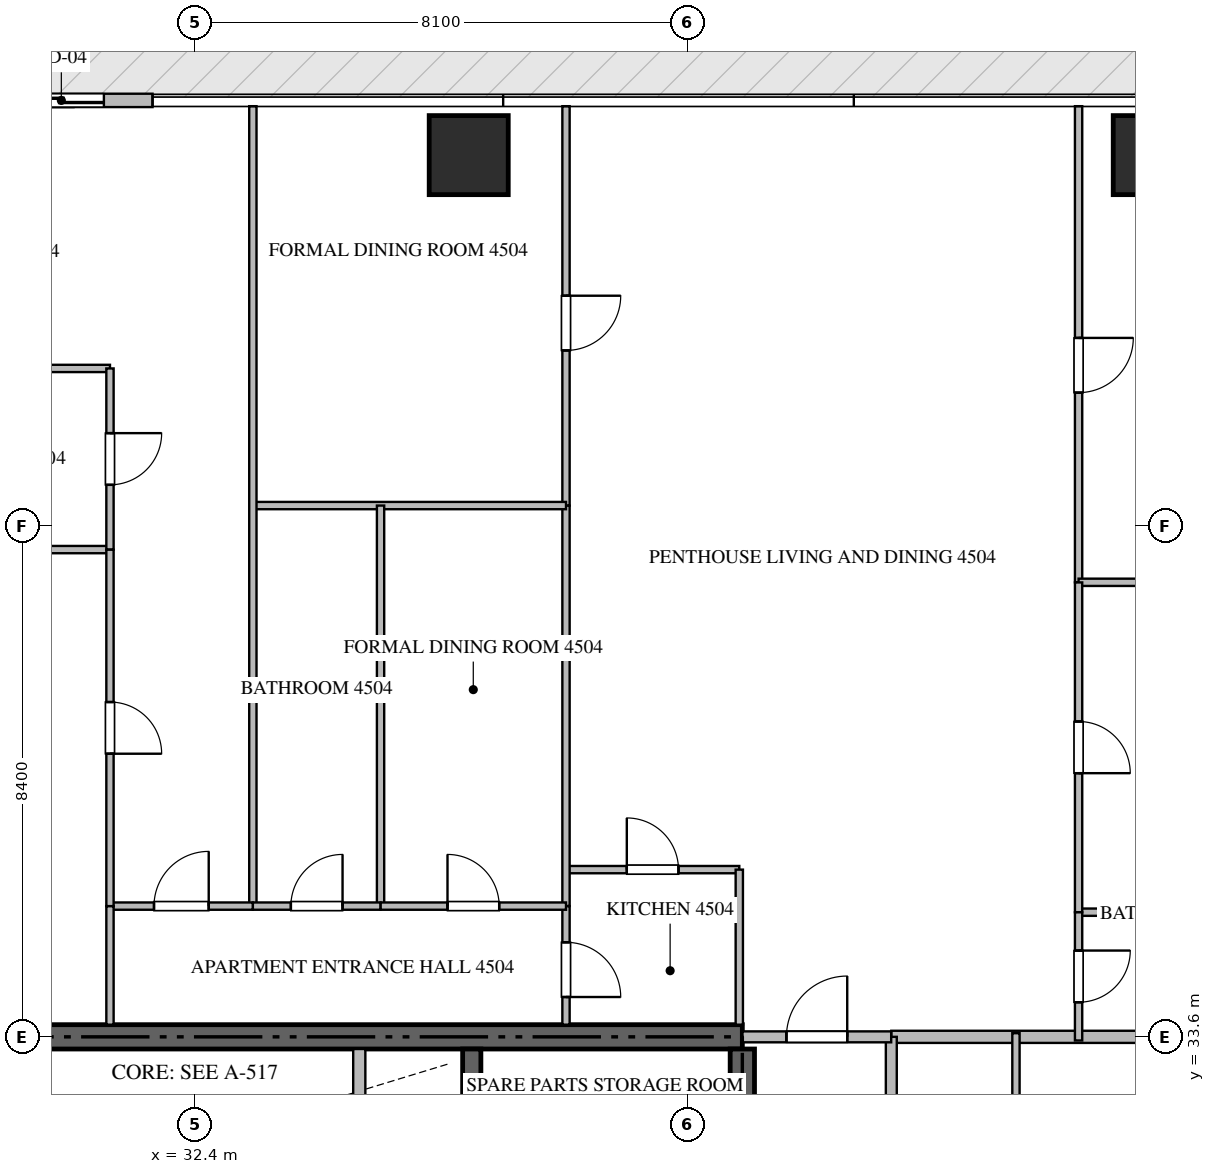
"""IFC4 building model, lengths in metres.
Left out: names, types, materials, properties, quantities, classifications, styles, units other than length and angle.
Written with IfcOpenShell. Run it as: python <this file> out.ifc"""

import sys

from ifc_helpers import new_model, si_unit, direction, frame, frame_2d, origin, origin_2d, place, context, subcontext, project, spatial, rectangle, extrude, source, transform, mapped, element, fill, save


model = new_model("IFC4")
c1 = context("Model", 3, precision=1e-05, world=origin(), true_north=direction((0.0, 1.0)))
c2 = subcontext(c1, "Body", "Model", "MODEL_VIEW")
j1 = project(units=[si_unit("LENGTHUNIT", "METRE"), si_unit("PLANEANGLEUNIT", "RADIAN")], contexts=[c1])
p1 = place(None, origin())
s1 = spatial("IfcSite", under=j1, at=p1, CompositionType="ELEMENT")
p2 = place(p1, origin())
s2 = spatial("IfcBuilding", under=s1, at=p2, CompositionType="ELEMENT")
p3 = place(p2, frame((0.0, 0.0, 180.15)))
s3 = spatial("IfcBuildingStorey", under=s2, at=p3, CompositionType="ELEMENT", Elevation=180.15)
p4 = place(p3, frame((41.4, 33.6, -0.26), z_axis=(0.0, 0.0, 1.0), x_axis=(-1.0, 0.0, 0.0)))
e1 = element("IfcWall", 1, at=p4, inside=s3, PredefinedType="SHEAR", context=c2, shape_type="SweptSolid", body=[
    extrude(rectangle(XDim=18.0, YDim=0.4, at=frame_2d((9.0, 0.0))), origin(), (0.0, 0.0, 1.0), 3.748),
])
p5 = place(p3, frame((41.4, 27.75, -0.26), z_axis=(0.0, 0.0, 1.0), x_axis=(0.0, 1.0, 0.0)))
e2 = element("IfcWall", 2, at=p5, inside=s3, PredefinedType="SHEAR", context=c2, shape_type="SweptSolid", body=[
    extrude(rectangle(XDim=5.65, YDim=0.4, at=frame_2d((2.825, 0.0))), origin(), (0.0, 0.0, 1.0), 3.748),
])
p6 = place(p3, frame((36.95, 27.05, -0.26), z_axis=(0.0, 0.0, 1.0), x_axis=(0.0, 1.0, 0.0)))
e3 = element("IfcWall", 3, at=p6, inside=s3, PredefinedType="SHEAR", context=c2, shape_type="SweptSolid", body=[
    extrude(rectangle(XDim=6.35, YDim=0.3, at=frame_2d((3.175, 0.0))), origin(), (0.0, 0.0, 1.0), 3.748),
])
m1 = source(origin(), c2, "Body", "SweptSolid", [
    extrude(rectangle(XDim=1.3, YDim=1.3, at=origin_2d()), origin(), (0.0, 0.0, 1.0), 3.75),
])
for number, where, z_axis, x_axis in (
    (4, (36.9, 48.1, -0.26), (0.0, 0.0, 1.0), (1.0, 0.0, 0.0)),
    (5, (48.15, 48.1, -0.26), (0.0, 0.0, 1.0), (1.0, 0.0, 0.0)),
):
    element("IfcColumn", number, at=place(p3, frame(where, z_axis=z_axis, x_axis=x_axis)), inside=s3, PredefinedType="COLUMN", context=c2, shape_type="MappedRepresentation", body=[
        mapped(m1, transform((0.0, 0.0, 0.0), scale=1.0)),
    ])
p7 = place(p3, frame((31.7, 49.0, 0.0), z_axis=(0.0, 0.0, 1.0), x_axis=(-1.0, 0.0, 0.0)))
e6 = element("IfcWall", 6, at=p7, inside=s3, PredefinedType="ELEMENTEDWALL", context=c2, shape_type="SweptSolid", body=[
    extrude(rectangle(XDim=3.0, YDim=0.22, at=frame_2d((1.5, 0.0))), origin(), (0.0, 0.0, 1.0), 3.475),
])
p8 = place(p7, frame((0.8, 0.0, 0.0)))
e7 = element("IfcOpeningElement", 7, at=p8, cuts=e6, PredefinedType="OPENING", context=c2, shape_type="SweptSolid", body=[
    extrude(rectangle(XDim=1.4, YDim=2.25, at=frame_2d((0.7, 1.125))), frame((0.0, 0.12, 0.0), z_axis=(0.0, -1.0, 0.0), x_axis=(1.0, 0.0, 0.0)), (0.0, 0.0, 1.0), 0.24),
])
p9 = place(p3, frame((35.1, 30.75, 0.0), z_axis=(0.0, 0.0, 1.0), x_axis=(0.0, 1.0, 0.0)))
e8 = element("IfcWall", 8, at=p9, inside=s3, PredefinedType="STANDARD", context=c2, shape_type="SweptSolid", body=[
    extrude(rectangle(XDim=2.65, YDim=0.2, at=frame_2d((1.325, 0.0))), origin(), (0.0, 0.0, 1.0), 3.49),
])
p10 = place(p3, frame((43.85, 33.6, 0.0), z_axis=(0.0, 0.0, 1.0), x_axis=(1.0, 0.0, 0.0)))
e9 = element("IfcWall", 9, at=p10, inside=s3, PredefinedType="PARTITIONING", context=c2, shape_type="SweptSolid", body=[
    extrude(rectangle(XDim=13.068, YDim=0.2, at=frame_2d((6.534, 0.0))), origin(), (0.0, 0.0, 1.0), 3.49),
])
p11 = place(p3, frame((43.85, 14.9, 0.0), z_axis=(0.0, 0.0, 1.0), x_axis=(0.0, 1.0, 0.0)))
e10 = element("IfcWall", 10, at=p11, inside=s3, PredefinedType="PARTITIONING", context=c2, shape_type="SweptSolid", body=[
    extrude(rectangle(XDim=18.7, YDim=0.18, at=frame_2d((9.35, 0.0))), origin(), (0.0, 0.0, 1.0), 3.49),
])
p12 = place(p11, frame((5.629, 0.0, 0.0)))
e11 = element("IfcOpeningElement", 11, at=p12, cuts=e10, PredefinedType="OPENING", context=c2, shape_type="SweptSolid", body=[
    extrude(rectangle(XDim=1.0, YDim=2.15, at=frame_2d((0.5, 1.075))), frame((0.0, 0.1, 0.0), z_axis=(0.0, -1.0, 0.0), x_axis=(1.0, 0.0, 0.0)), (0.0, 0.0, 1.0), 0.2),
])
p13 = place(p11, frame((10.709, 0.0, 0.0)))
e12 = element("IfcOpeningElement", 12, at=p13, cuts=e10, PredefinedType="OPENING", context=c2, shape_type="SweptSolid", body=[
    extrude(rectangle(XDim=1.0, YDim=2.15, at=frame_2d((0.5, 1.075))), frame((0.0, 0.1, 0.0), z_axis=(0.0, -1.0, 0.0), x_axis=(1.0, 0.0, 0.0)), (0.0, 0.0, 1.0), 0.2),
])
p14 = place(p3, frame((41.402, 33.6, 0.0), z_axis=(0.0, 0.0, 1.0), x_axis=(1.0, 0.0, 0.0)))
e13 = element("IfcWall", 13, at=p14, inside=s3, PredefinedType="PARTITIONING", context=c2, shape_type="SweptSolid", body=[
    extrude(rectangle(XDim=2.446, YDim=0.18, at=frame_2d((1.223, 0.0))), origin(), (0.0, 0.0, 1.0), 3.49),
])
p15 = place(p14, frame((0.723, 0.0, 0.0)))
e14 = element("IfcOpeningElement", 14, at=p15, cuts=e13, PredefinedType="OPENING", context=c2, shape_type="SweptSolid", body=[
    extrude(rectangle(XDim=1.0, YDim=2.15, at=frame_2d((0.5, 1.075))), frame((0.0, 0.1, 0.0), z_axis=(0.0, -1.0, 0.0), x_axis=(1.0, 0.0, 0.0)), (0.0, 0.0, 1.0), 0.2),
])
p16 = place(p3, frame((38.5, 36.35, 0.0), z_axis=(0.0, 0.0, 1.0), x_axis=(1.0, 0.0, 0.0)))
e15 = element("IfcWall", 15, at=p16, inside=s3, PredefinedType="PARTITIONING", context=c2, shape_type="SweptSolid", body=[
    extrude(rectangle(XDim=2.85, YDim=0.12, at=frame_2d((1.425, 0.0))), origin(), (0.0, 0.0, 1.0), 3.49),
])
p17 = place(p16, frame((1.0, 0.0, 0.0)))
e16 = element("IfcOpeningElement", 16, at=p17, cuts=e15, PredefinedType="OPENING", context=c2, shape_type="SweptSolid", body=[
    extrude(rectangle(XDim=0.85, YDim=2.1, at=frame_2d((0.425, 1.05))), frame((0.0, 0.07, 0.0), z_axis=(0.0, -1.0, 0.0), x_axis=(1.0, 0.0, 0.0)), (0.0, 0.0, 1.0), 0.14),
])
p18 = place(p3, frame((41.35, 36.35, 0.0), z_axis=(0.0, 0.0, 1.0), x_axis=(0.0, -1.0, 0.0)))
e17 = element("IfcWall", 17, at=p18, inside=s3, PredefinedType="PARTITIONING", context=c2, shape_type="SweptSolid", body=[
    extrude(rectangle(XDim=2.55, YDim=0.12, at=frame_2d((1.275, 0.0))), origin(), (0.0, 0.0, 1.0), 3.49),
])
p19 = place(p3, frame((38.5, 35.75, 0.0), z_axis=(0.0, 0.0, 1.0), x_axis=(0.0, -1.0, 0.0)))
e18 = element("IfcWall", 18, at=p19, inside=s3, PredefinedType="PARTITIONING", context=c2, shape_type="SweptSolid", body=[
    extrude(rectangle(XDim=1.95, YDim=0.12, at=frame_2d((0.975, 0.0))), origin(), (0.0, 0.0, 1.0), 3.49),
])
p20 = place(p19, frame((0.595, 0.0, 0.0)))
e19 = element("IfcOpeningElement", 19, at=p20, cuts=e18, PredefinedType="OPENING", context=c2, shape_type="SweptSolid", body=[
    extrude(rectangle(XDim=0.9, YDim=2.1, at=frame_2d((0.45, 1.05))), frame((0.0, 0.07, 0.0), z_axis=(0.0, -1.0, 0.0), x_axis=(1.0, 0.0, 0.0)), (0.0, 0.0, 1.0), 0.14),
])
p21 = place(p3, frame((38.5, 48.905, 0.0), z_axis=(0.0, 0.0, 1.0), x_axis=(0.0, -1.0, 0.0)))
e20 = element("IfcWall", 20, at=p21, inside=s3, PredefinedType="PARTITIONING", context=c2, shape_type="SweptSolid", body=[
    extrude(rectangle(XDim=6.568, YDim=0.12, at=frame_2d((3.284, 0.0))), origin(), (0.0, 0.0, 1.0), 3.49),
])
p22 = place(p21, frame((3.117, 0.0, 0.0)))
e21 = element("IfcOpeningElement", 21, at=p22, cuts=e20, PredefinedType="OPENING", context=c2, shape_type="SweptSolid", body=[
    extrude(rectangle(XDim=0.9, YDim=2.1, at=frame_2d((0.45, 1.05))), frame((0.0, 0.07, 0.0), z_axis=(0.0, -1.0, 0.0), x_axis=(1.0, 0.0, 0.0)), (0.0, 0.0, 1.0), 0.14),
])
p23 = place(p3, frame((38.5, 42.335, 0.0), z_axis=(0.0, 0.0, 1.0), x_axis=(0.0, -1.0, 0.0)))
e22 = element("IfcWall", 22, at=p23, inside=s3, PredefinedType="PARTITIONING", context=c2, shape_type="SweptSolid", body=[
    extrude(rectangle(XDim=6.583, YDim=0.12, at=frame_2d((3.292, 0.0))), origin(), (0.0, 0.0, 1.0), 3.49),
])
p24 = place(p3, frame((33.35, 42.337, 0.0), z_axis=(0.0, 0.0, 1.0), x_axis=(1.0, 0.0, 0.0)))
e23 = element("IfcWall", 23, at=p24, inside=s3, PredefinedType="PARTITIONING", context=c2, shape_type="SweptSolid", body=[
    extrude(rectangle(XDim=5.15, YDim=0.12, at=frame_2d((2.575, 0.0))), origin(), (0.0, 0.0, 1.0), 3.49),
])
p25 = place(p3, frame((33.35, 48.905, 0.0), z_axis=(0.0, 0.0, 1.0), x_axis=(0.0, -1.0, 0.0)))
e24 = element("IfcWall", 24, at=p25, inside=s3, PredefinedType="PARTITIONING", context=c2, shape_type="SweptSolid", body=[
    extrude(rectangle(XDim=13.155, YDim=0.12, at=frame_2d((6.578, 0.0))), origin(), (0.0, 0.0, 1.0), 3.49),
])
p26 = place(p3, frame((35.45, 42.337, 0.0), z_axis=(0.0, 0.0, 1.0), x_axis=(0.0, -1.0, 0.0)))
e25 = element("IfcWall", 25, at=p26, inside=s3, PredefinedType="PARTITIONING", context=c2, shape_type="SweptSolid", body=[
    extrude(rectangle(XDim=6.587, YDim=0.12, at=frame_2d((3.293, 0.0))), origin(), (0.0, 0.0, 1.0), 3.49),
])
p27 = place(p3, frame((33.35, 35.75, 0.0), z_axis=(0.0, 0.0, 1.0), x_axis=(1.0, 0.0, 0.0)))
e26 = element("IfcWall", 26, at=p27, inside=s3, PredefinedType="PARTITIONING", context=c2, shape_type="SweptSolid", body=[
    extrude(rectangle(XDim=2.1, YDim=0.12, at=frame_2d((1.05, 0.0))), origin(), (0.0, 0.0, 1.0), 3.49),
])
p28 = place(p27, frame((0.625, 0.0, 0.0)))
e27 = element("IfcOpeningElement", 27, at=p28, cuts=e26, PredefinedType="OPENING", context=c2, shape_type="SweptSolid", body=[
    extrude(rectangle(XDim=0.85, YDim=2.1, at=frame_2d((0.425, 1.05))), frame((0.0, 0.07, 0.0), z_axis=(0.0, -1.0, 0.0), x_axis=(1.0, 0.0, 0.0)), (0.0, 0.0, 1.0), 0.14),
])
p29 = place(p3, frame((35.452, 35.75, 0.0), z_axis=(0.0, 0.0, 1.0), x_axis=(1.0, 0.0, 0.0)))
e28 = element("IfcWall", 28, at=p29, inside=s3, PredefinedType="PARTITIONING", context=c2, shape_type="SweptSolid", body=[
    extrude(rectangle(XDim=3.048, YDim=0.12, at=frame_2d((1.524, 0.0))), origin(), (0.0, 0.0, 1.0), 3.49),
])
p30 = place(p29, frame((1.099, 0.0, 0.0)))
e29 = element("IfcOpeningElement", 29, at=p30, cuts=e28, PredefinedType="OPENING", context=c2, shape_type="SweptSolid", body=[
    extrude(rectangle(XDim=0.85, YDim=2.1, at=frame_2d((0.425, 1.05))), frame((0.0, 0.07, 0.0), z_axis=(0.0, -1.0, 0.0), x_axis=(1.0, 0.0, 0.0)), (0.0, 0.0, 1.0), 0.14),
])
p31 = place(p3, frame((31.0, 35.75, 0.0), z_axis=(0.0, 0.0, 1.0), x_axis=(1.0, 0.0, 0.0)))
e30 = element("IfcWall", 30, at=p31, inside=s3, PredefinedType="PARTITIONING", context=c2, shape_type="SweptSolid", body=[
    extrude(rectangle(XDim=2.348, YDim=0.12, at=frame_2d((1.174, 0.0))), origin(), (0.0, 0.0, 1.0), 3.49),
])
p32 = place(p31, frame((0.724, 0.0, 0.0)))
e31 = element("IfcOpeningElement", 31, at=p32, cuts=e30, PredefinedType="OPENING", context=c2, shape_type="SweptSolid", body=[
    extrude(rectangle(XDim=0.9, YDim=2.1, at=frame_2d((0.45, 1.05))), frame((0.0, 0.07, 0.0), z_axis=(0.0, -1.0, 0.0), x_axis=(1.0, 0.0, 0.0)), (0.0, 0.0, 1.0), 0.14),
])
for number, where, z_axis, x_axis in (
    (32, (26.3, 44.592, 0.0), (0.0, 0.0, 1.0), (1.0, 0.0, 0.0)),
    (33, (26.3, 41.613, 0.0), (0.0, 0.0, 1.0), (1.0, 0.0, 0.0)),
):
    element("IfcWall", number, at=place(p3, frame(where, z_axis=z_axis, x_axis=x_axis)), inside=s3, PredefinedType="PARTITIONING", context=c2, shape_type="SweptSolid", body=[
        extrude(rectangle(XDim=4.7, YDim=0.12, at=frame_2d((2.35, 0.0))), origin(), (0.0, 0.0, 1.0), 3.49),
    ])
p33 = place(p3, frame((31.0, 44.592, 0.0), z_axis=(0.0, 0.0, 1.0), x_axis=(0.0, -1.0, 0.0)))
e34 = element("IfcWall", 34, at=p33, inside=s3, PredefinedType="PARTITIONING", context=c2, shape_type="SweptSolid", body=[
    extrude(rectangle(XDim=2.979, YDim=0.12, at=frame_2d((1.49, 0.0))), origin(), (0.0, 0.0, 1.0), 3.49),
])
p34 = place(p33, frame((1.064, 0.0, 0.0)))
e35 = element("IfcOpeningElement", 35, at=p34, cuts=e34, PredefinedType="OPENING", context=c2, shape_type="SweptSolid", body=[
    extrude(rectangle(XDim=0.85, YDim=2.1, at=frame_2d((0.425, 1.05))), frame((0.0, 0.07, 0.0), z_axis=(0.0, -1.0, 0.0), x_axis=(1.0, 0.0, 0.0)), (0.0, 0.0, 1.0), 0.14),
])
p35 = place(p3, frame((31.0, 41.611, 0.0), z_axis=(0.0, 0.0, 1.0), x_axis=(0.0, -1.0, 0.0)))
e36 = element("IfcWall", 36, at=p35, inside=s3, PredefinedType="PARTITIONING", context=c2, shape_type="SweptSolid", body=[
    extrude(rectangle(XDim=5.861, YDim=0.12, at=frame_2d((2.931, 0.0))), origin(), (0.0, 0.0, 1.0), 3.49),
])
p36 = place(p35, frame((2.505, 0.0, 0.0)))
e37 = element("IfcOpeningElement", 37, at=p36, cuts=e36, PredefinedType="OPENING", context=c2, shape_type="SweptSolid", body=[
    extrude(rectangle(XDim=0.85, YDim=2.1, at=frame_2d((0.425, 1.05))), frame((0.0, 0.07, 0.0), z_axis=(0.0, -1.0, 0.0), x_axis=(1.0, 0.0, 0.0)), (0.0, 0.0, 1.0), 0.14),
])
p37 = place(p3, frame((31.0, 35.748, 0.0), z_axis=(0.0, 0.0, 1.0), x_axis=(0.0, -1.0, 0.0)))
e38 = element("IfcWall", 38, at=p37, inside=s3, PredefinedType="PARTITIONING", context=c2, shape_type="SweptSolid", body=[
    extrude(rectangle(XDim=1.948, YDim=0.12, at=frame_2d((0.974, 0.0))), origin(), (0.0, 0.0, 1.0), 3.49),
])
p38 = place(p3, frame((46.93, 48.905, 0.0), z_axis=(0.0, 0.0, 1.0), x_axis=(0.0, -1.0, 0.0)))
e39 = element("IfcWall", 39, at=p38, inside=s3, PredefinedType="PARTITIONING", context=c2, shape_type="SweptSolid", body=[
    extrude(rectangle(XDim=7.83, YDim=0.12, at=frame_2d((3.915, 0.0))), origin(), (0.0, 0.0, 1.0), 3.49),
])
p39 = place(p38, frame((3.811, 0.0, 0.0)))
e40 = element("IfcOpeningElement", 40, at=p39, cuts=e39, PredefinedType="OPENING", context=c2, shape_type="SweptSolid", body=[
    extrude(rectangle(XDim=0.9, YDim=2.1, at=frame_2d((0.45, 1.05))), frame((0.0, 0.07, 0.0), z_axis=(0.0, -1.0, 0.0), x_axis=(1.0, 0.0, 0.0)), (0.0, 0.0, 1.0), 0.14),
])
p40 = place(p3, frame((46.93, 41.075, 0.0), z_axis=(0.0, 0.0, 1.0), x_axis=(1.0, 0.0, 0.0)))
e41 = element("IfcWall", 41, at=p40, inside=s3, PredefinedType="PARTITIONING", context=c2, shape_type="SweptSolid", body=[
    extrude(rectangle(XDim=5.975, YDim=0.12, at=frame_2d((2.988, 0.0))), origin(), (0.0, 0.0, 1.0), 3.49),
])
p41 = place(p3, frame((46.93, 35.65, 0.0), z_axis=(0.0, 0.0, 1.0), x_axis=(1.0, 0.0, 0.0)))
e42 = element("IfcWall", 42, at=p41, inside=s3, PredefinedType="PARTITIONING", context=c2, shape_type="SweptSolid", body=[
    extrude(rectangle(XDim=3.2, YDim=0.12, at=frame_2d((1.6, 0.0))), origin(), (0.0, 0.0, 1.0), 3.49),
])
p42 = place(p3, frame((46.93, 41.073, 0.0), z_axis=(0.0, 0.0, 1.0), x_axis=(0.0, -1.0, 0.0)))
e43 = element("IfcWall", 43, at=p42, inside=s3, PredefinedType="PARTITIONING", context=c2, shape_type="SweptSolid", body=[
    extrude(rectangle(XDim=5.423, YDim=0.12, at=frame_2d((2.711, 0.0))), origin(), (0.0, 0.0, 1.0), 3.49),
])
p43 = place(p42, frame((2.287, 0.0, 0.0)))
e44 = element("IfcOpeningElement", 44, at=p43, cuts=e43, PredefinedType="OPENING", context=c2, shape_type="SweptSolid", body=[
    extrude(rectangle(XDim=0.85, YDim=2.1, at=frame_2d((0.425, 1.05))), frame((0.0, 0.07, 0.0), z_axis=(0.0, -1.0, 0.0), x_axis=(1.0, 0.0, 0.0)), (0.0, 0.0, 1.0), 0.14),
])
p44 = place(p3, frame((46.93, 35.648, 0.0), z_axis=(0.0, 0.0, 1.0), x_axis=(0.0, -1.0, 0.0)))
e45 = element("IfcWall", 45, at=p44, inside=s3, PredefinedType="PARTITIONING", context=c2, shape_type="SweptSolid", body=[
    extrude(rectangle(XDim=2.108, YDim=0.12, at=frame_2d((1.054, 0.0))), origin(), (0.0, 0.0, 1.0), 3.49),
])
p45 = place(p44, frame((0.629, 0.0, 0.0)))
e46 = element("IfcOpeningElement", 46, at=p45, cuts=e45, PredefinedType="OPENING", context=c2, shape_type="SweptSolid", body=[
    extrude(rectangle(XDim=0.85, YDim=2.1, at=frame_2d((0.425, 1.05))), frame((0.0, 0.07, 0.0), z_axis=(0.0, -1.0, 0.0), x_axis=(1.0, 0.0, 0.0)), (0.0, 0.0, 1.0), 0.14),
])
p46 = place(p3, frame((45.9, 27.8, 0.0), z_axis=(0.0, 0.0, 1.0), x_axis=(0.0, 1.0, 0.0)))
e47 = element("IfcWall", 47, at=p46, inside=s3, PredefinedType="PARTITIONING", context=c2, shape_type="SweptSolid", body=[
    extrude(rectangle(XDim=5.86, YDim=0.12, at=frame_2d((2.93, 0.0))), origin(), (0.0, 0.0, 1.0), 3.49),
])
m2 = source(origin(), c2, "Body", "SweptSolid", [
    extrude(rectangle(XDim=1.4, YDim=2.25, at=frame_2d((0.7, 1.125))), frame((0.0, 0.025, 0.0), z_axis=(0.0, -1.0, 0.0), x_axis=(1.0, 0.0, 0.0)), (0.0, 0.0, 1.0), 0.05),
])
p47 = place(p8, origin())
e48 = element("IfcDoor", 48, at=p47, inside=s3, OperationType="SLIDING_TO_LEFT", PredefinedType="DOOR", context=c2, shape_type="MappedRepresentation", body=[
    mapped(m2, transform((0.0, 0.0, 0.0), scale=1.0)),
])
fill(e7, e48)
m3 = source(origin(), c2, "Body", "SweptSolid", [
    extrude(rectangle(XDim=1.0, YDim=2.15, at=frame_2d((0.5, 1.075))), frame((0.0, 0.025, 0.0), z_axis=(0.0, -1.0, 0.0), x_axis=(1.0, 0.0, 0.0)), (0.0, 0.0, 1.0), 0.05),
])
p48 = place(p15, origin())
e49 = element("IfcDoor", 49, at=p48, inside=s3, OperationType="SINGLE_SWING_RIGHT", PredefinedType="DOOR", context=c2, shape_type="MappedRepresentation", body=[
    mapped(m3, transform((0.0, 0.0, 0.0), scale=1.0)),
])
fill(e14, e49)
m4 = source(origin(), c2, "Body", "SweptSolid", [
    extrude(rectangle(XDim=0.85, YDim=2.1, at=frame_2d((0.425, 1.05))), frame((0.0, 0.025, 0.0), z_axis=(0.0, -1.0, 0.0), x_axis=(1.0, 0.0, 0.0)), (0.0, 0.0, 1.0), 0.05),
])
p49 = place(p17, origin())
e50 = element("IfcDoor", 50, at=p49, inside=s3, OperationType="SINGLE_SWING_LEFT", PredefinedType="DOOR", context=c2, shape_type="MappedRepresentation", body=[
    mapped(m4, transform((0.0, 0.0, 0.0), scale=1.0)),
])
fill(e16, e50)
m5 = source(origin(), c2, "Body", "SweptSolid", [
    extrude(rectangle(XDim=0.9, YDim=2.1, at=frame_2d((0.45, 1.05))), frame((0.0, 0.025, 0.0), z_axis=(0.0, -1.0, 0.0), x_axis=(1.0, 0.0, 0.0)), (0.0, 0.0, 1.0), 0.05),
])
p50 = place(p20, origin())
e51 = element("IfcDoor", 51, at=p50, inside=s3, OperationType="SINGLE_SWING_RIGHT", PredefinedType="DOOR", context=c2, shape_type="MappedRepresentation", body=[
    mapped(m5, transform((0.0, 0.0, 0.0), scale=1.0)),
])
fill(e19, e51)
p51 = place(p22, origin())
e52 = element("IfcDoor", 52, at=p51, inside=s3, OperationType="SINGLE_SWING_LEFT", PredefinedType="DOOR", context=c2, shape_type="MappedRepresentation", body=[
    mapped(m5, transform((0.0, 0.0, 0.0), scale=1.0)),
])
fill(e21, e52)
p52 = place(p28, origin())
e53 = element("IfcDoor", 53, at=p52, inside=s3, OperationType="SINGLE_SWING_RIGHT", PredefinedType="DOOR", context=c2, shape_type="MappedRepresentation", body=[
    mapped(m4, transform((0.0, 0.0, 0.0), scale=1.0)),
])
fill(e27, e53)
p53 = place(p30, origin())
e54 = element("IfcDoor", 54, at=p53, inside=s3, OperationType="SINGLE_SWING_LEFT", PredefinedType="DOOR", context=c2, shape_type="MappedRepresentation", body=[
    mapped(m4, transform((0.0, 0.0, 0.0), scale=1.0)),
])
fill(e29, e54)
p54 = place(p32, origin())
e55 = element("IfcDoor", 55, at=p54, inside=s3, OperationType="SINGLE_SWING_RIGHT", PredefinedType="DOOR", context=c2, shape_type="MappedRepresentation", body=[
    mapped(m5, transform((0.0, 0.0, 0.0), scale=1.0)),
])
fill(e31, e55)
p55 = place(p34, origin())
e56 = element("IfcDoor", 56, at=p55, inside=s3, OperationType="SINGLE_SWING_LEFT", PredefinedType="DOOR", context=c2, shape_type="MappedRepresentation", body=[
    mapped(m4, transform((0.0, 0.0, 0.0), scale=1.0)),
])
fill(e35, e56)
p56 = place(p36, origin())
e57 = element("IfcDoor", 57, at=p56, inside=s3, OperationType="SINGLE_SWING_RIGHT", PredefinedType="DOOR", context=c2, shape_type="MappedRepresentation", body=[
    mapped(m4, transform((0.0, 0.0, 0.0), scale=1.0)),
])
fill(e37, e57)
p57 = place(p39, origin())
e58 = element("IfcDoor", 58, at=p57, inside=s3, OperationType="SINGLE_SWING_LEFT", PredefinedType="DOOR", context=c2, shape_type="MappedRepresentation", body=[
    mapped(m5, transform((0.0, 0.0, 0.0), scale=1.0)),
])
fill(e40, e58)
p58 = place(p43, origin())
e59 = element("IfcDoor", 59, at=p58, inside=s3, OperationType="SINGLE_SWING_RIGHT", PredefinedType="DOOR", context=c2, shape_type="MappedRepresentation", body=[
    mapped(m4, transform((0.0, 0.0, 0.0), scale=1.0)),
])
fill(e44, e59)
p59 = place(p45, origin())
e60 = element("IfcDoor", 60, at=p59, inside=s3, OperationType="SINGLE_SWING_LEFT", PredefinedType="DOOR", context=c2, shape_type="MappedRepresentation", body=[
    mapped(m4, transform((0.0, 0.0, 0.0), scale=1.0)),
])
fill(e46, e60)
save(model, sys.argv[1])
